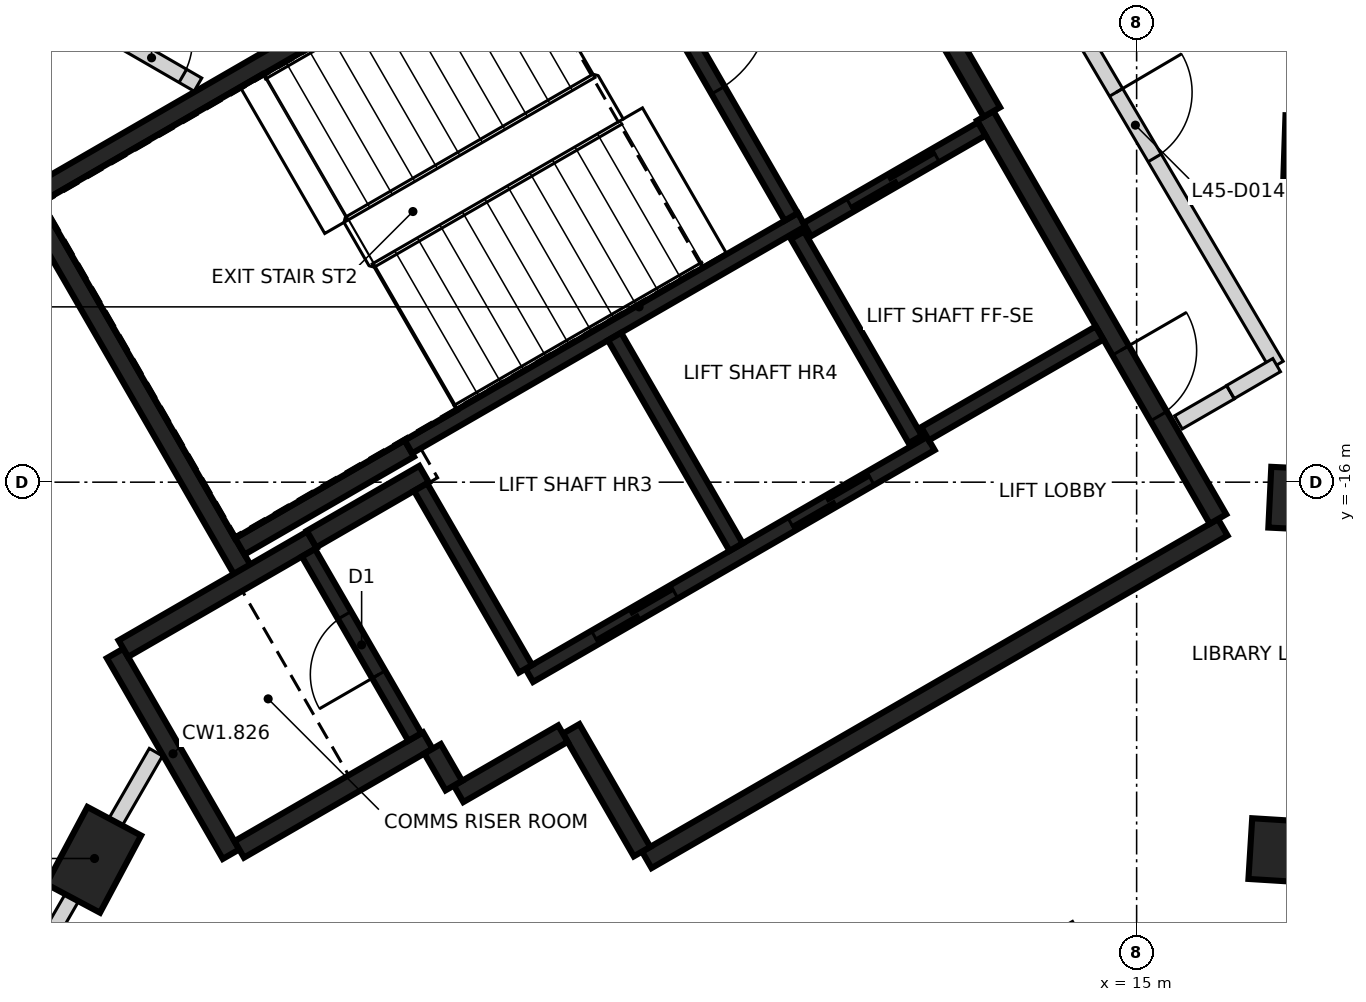
"""IFC4 building model, lengths in metres.
Left out: names, types, materials, properties, quantities, classifications, styles, units other than length and angle.
Written with IfcOpenShell. Run it as: python <this file> out.ifc"""

import sys

from ifc_helpers import new_model, si_unit, direction, frame, frame_2d, origin, origin_2d, place, context, subcontext, project, spatial, rectangle, extrude, element, fill, save


model = new_model("IFC4")
c1 = context("Model", 3, precision=1e-05, world=origin(), true_north=direction((0.0, 1.0)))
c2 = subcontext(c1, "Body", "Model", "MODEL_VIEW")
j1 = project(units=[si_unit("LENGTHUNIT", "METRE"), si_unit("PLANEANGLEUNIT", "RADIAN")], contexts=[c1])
p1 = place(None, origin())
s1 = spatial("IfcSite", under=j1, at=p1, CompositionType="ELEMENT")
p2 = place(p1, origin())
s2 = spatial("IfcBuilding", under=s1, at=p2, CompositionType="ELEMENT")
p3 = place(p2, frame((0.0, 0.0, 182.8)))
s3 = spatial("IfcBuildingStorey", under=s2, at=p3, CompositionType="ELEMENT", Elevation=182.8)
for number, where, z_axis, x_axis in (
    (1, (17.07, -20.856, -0.35), (0.0, 0.0, 1.0), (-0.998, 0.062, 0.0)),
    (2, (17.326, -16.226, -0.35), (0.0, 0.0, 1.0), (-0.999, 0.048, 0.0)),
    (3, (17.519, -11.592, -0.35), (0.0, 0.0, 1.0), (-0.999, 0.034, 0.0)),
    (4, (1.279, -20.968, -0.35), (0.0, 0.0, 1.0), (0.47, 0.883, 0.0)),
):
    element("IfcColumn", number, at=place(p3, frame(where, z_axis=z_axis, x_axis=x_axis)), inside=s3, PredefinedType="COLUMN", context=c2, shape_type="SweptSolid", body=[
        extrude(rectangle(XDim=1.15, YDim=0.8, at=origin_2d()), origin(), (0.0, 0.0, 1.0), 3.6),
    ])
p4 = place(p3, frame((0.417, -12.273, 0.0), z_axis=(0.0, 0.0, 1.0), x_axis=(0.866021906294, 0.500006057782, 0.0)))
e5 = element("IfcWall", 5, at=p4, inside=s3, PredefinedType="SHEAR", context=c2, shape_type="SweptSolid", body=[
    extrude(rectangle(XDim=11.55, YDim=0.25, at=frame_2d((5.775, 0.0))), origin(), (0.0, 0.0, 1.0), 3.25),
])
p5 = place(p4, frame((10.025, 0.0, 0.0)))
e6 = element("IfcOpeningElement", 6, at=p5, cuts=e5, PredefinedType="OPENING", context=c2, shape_type="SweptSolid", body=[
    extrude(rectangle(XDim=1.2, YDim=2.1, at=frame_2d((0.6, 1.05))), frame((0.0, 0.135, 0.0), z_axis=(0.0, -1.0, 0.0), x_axis=(1.0, 0.0, 0.0)), (0.0, 0.0, 1.0), 0.27),
])
p6 = place(p4, frame((8.725, 0.0, 0.0)))
e7 = element("IfcOpeningElement", 7, at=p6, cuts=e5, PredefinedType="OPENING", context=c2, shape_type="SweptSolid", body=[
    extrude(rectangle(XDim=1.2, YDim=2.1, at=frame_2d((0.6, 1.05))), frame((0.0, 0.135, 0.0), z_axis=(0.0, -1.0, 0.0), x_axis=(1.0, 0.0, 0.0)), (0.0, 0.0, 1.0), 0.27),
])
p7 = place(p3, frame((16.133, -16.594, 0.0), z_axis=(0.0, 0.0, 1.0), x_axis=(-0.866022959057, -0.500004234368, 0.0)))
e8 = element("IfcWall", 8, at=p7, inside=s3, PredefinedType="SHEAR", context=c2, shape_type="SweptSolid", body=[
    extrude(rectangle(XDim=8.75, YDim=0.25, at=frame_2d((4.375, 0.0))), origin(), (0.0, 0.0, 1.0), 3.25),
])
p8 = place(p3, frame((13.008, -11.181, 0.0), z_axis=(0.0, 0.0, 1.0), x_axis=(0.500001955336, -0.866024274868, 0.0)))
e9 = element("IfcWall", 9, at=p8, inside=s3, PredefinedType="SHEAR", context=c2, shape_type="SweptSolid", body=[
    extrude(rectangle(XDim=6.125, YDim=0.25, at=frame_2d((3.062, 0.0))), origin(), (0.0, 0.0, 1.0), 3.25),
])
p9 = place(p8, frame((3.563, 0.0, 0.0)))
e10 = element("IfcOpeningElement", 10, at=p9, cuts=e9, PredefinedType="OPENING", context=c2, shape_type="SweptSolid", body=[
    extrude(rectangle(XDim=1.0, YDim=2.1, at=frame_2d((0.5, 1.05))), frame((0.0, 0.135, 0.0), z_axis=(0.0, -1.0, 0.0), x_axis=(1.0, 0.0, 0.0)), (0.0, 0.0, 1.0), 0.27),
])
p10 = place(p3, frame((3.235, -17.153, 0.0), z_axis=(0.0, 0.0, 1.0), x_axis=(-0.500008851346, 0.866020293397, 0.0)))
e11 = element("IfcWall", 11, at=p10, inside=s3, PredefinedType="SHEAR", context=c2, shape_type="SweptSolid", body=[
    extrude(rectangle(XDim=5.51, YDim=0.25, at=frame_2d((2.755, 0.0))), origin(), (0.0, 0.0, 1.0), 3.25),
])
p11 = place(p3, frame((10.483, -6.606, 0.0), z_axis=(0.0, 0.0, 1.0), x_axis=(0.49999885962, -0.866026062182, 0.0)))
e12 = element("IfcWall", 12, at=p11, inside=s3, PredefinedType="SHEAR", context=c2, shape_type="SweptSolid", body=[
    extrude(rectangle(XDim=5.225, YDim=0.25, at=frame_2d((2.612, 0.0))), origin(), (0.0, 0.0, 1.0), 3.25),
])
p12 = place(p3, frame((3.085, -20.894, 0.0), z_axis=(0.0, 0.0, 1.0), x_axis=(-0.499978833458, 0.866037623948, 0.0)))
e13 = element("IfcWall", 13, at=p12, inside=s3, PredefinedType="SHEAR", context=c2, shape_type="SweptSolid", body=[
    extrude(rectangle(XDim=3.05, YDim=0.25, at=frame_2d((1.525, 0.0))), origin(), (0.0, 0.0, 1.0), 3.25),
])
p13 = place(p3, frame((1.669, -18.19, 0.0), z_axis=(0.0, 0.0, 1.0), x_axis=(0.866042235819, 0.499970844928, 0.0)))
e14 = element("IfcWall", 14, at=p13, inside=s3, PredefinedType="SHEAR", context=c2, shape_type="SweptSolid", body=[
    extrude(rectangle(XDim=2.865, YDim=0.25, at=frame_2d((1.432, 0.0))), origin(), (0.0, 0.0, 1.0), 3.25),
])
p14 = place(p3, frame((5.675, -19.399, 0.0), z_axis=(0.0, 0.0, 1.0), x_axis=(-0.866026637627, -0.499997862916, 0.0)))
e15 = element("IfcWall", 15, at=p14, inside=s3, PredefinedType="SHEAR", context=c2, shape_type="SweptSolid", body=[
    extrude(rectangle(XDim=2.865, YDim=0.25, at=frame_2d((1.432, 0.0))), origin(), (0.0, 0.0, 1.0), 3.25),
])
p15 = place(p3, frame((5.431, -15.556, 0.0), z_axis=(0.0, 0.0, 1.0), x_axis=(-0.866022940537, -0.500004266446, 0.0)))
e16 = element("IfcWall", 16, at=p15, inside=s3, PredefinedType="SHEAR", context=c2, shape_type="SweptSolid", body=[
    extrude(rectangle(XDim=2.575, YDim=0.25, at=frame_2d((1.287, 0.0))), origin(), (0.0, 0.0, 1.0), 3.25),
])
p16 = place(p3, frame((8.493, -20.86, 0.0), z_axis=(0.0, 0.0, 1.0), x_axis=(-0.500039802285, 0.866002422705, 0.0)))
e17 = element("IfcWall", 17, at=p16, inside=s3, PredefinedType="SHEAR", context=c2, shape_type="SweptSolid", body=[
    extrude(rectangle(XDim=1.865, YDim=0.25, at=frame_2d((0.932, 0.0))), origin(), (0.0, 0.0, 1.0), 3.25),
])
p17 = place(p3, frame((4.145, -16.749, 0.0), z_axis=(0.0, 0.0, 1.0), x_axis=(0.866038183914, 0.499977863513, 0.0)))
e18 = element("IfcWall", 18, at=p17, inside=s3, PredefinedType="SHEAR", context=c2, shape_type="SweptSolid", body=[
    extrude(rectangle(XDim=1.71, YDim=0.25, at=frame_2d((0.855, 0.0))), origin(), (0.0, 0.0, 1.0), 3.25),
])
p18 = place(p3, frame((7.452, -19.308, 0.0), z_axis=(0.0, 0.0, 1.0), x_axis=(-0.866044474677, -0.49996696679, 0.0)))
e19 = element("IfcWall", 19, at=p18, inside=s3, PredefinedType="SHEAR", context=c2, shape_type="SweptSolid", body=[
    extrude(rectangle(XDim=1.584, YDim=0.25, at=frame_2d((0.792, 0.0))), origin(), (0.0, 0.0, 1.0), 3.25),
])
p19 = place(p3, frame((6.017, -19.992, 0.0), z_axis=(0.0, 0.0, 1.0), x_axis=(-0.500364886717, 0.865814633822, 0.0)))
e20 = element("IfcWall", 20, at=p19, inside=s3, PredefinedType="SHEAR", context=c2, shape_type="SweptSolid", body=[
    extrude(rectangle(XDim=0.559, YDim=0.25, at=frame_2d((0.28, 0.0))), origin(), (0.0, 0.0, 1.0), 3.25),
])
p20 = place(p3, frame((5.419, -15.534, 0.0), z_axis=(0.0, 0.0, 1.0), x_axis=(0.866029065029, 0.499993658486, 0.0)))
e21 = element("IfcWall", 21, at=p20, inside=s3, PredefinedType="SHEAR", context=c2, shape_type="SweptSolid", body=[
    extrude(rectangle(XDim=5.974, YDim=0.2, at=frame_2d((2.987, 0.0))), origin(), (0.0, 0.0, 1.0), 3.25),
])
p21 = place(p3, frame((7.01, -18.542, 0.0), z_axis=(0.0, 0.0, 1.0), x_axis=(0.866030299012, 0.499991521122, 0.0)))
e22 = element("IfcWall", 22, at=p21, inside=s3, PredefinedType="SHEAR", context=c2, shape_type="SweptSolid", body=[
    extrude(rectangle(XDim=6.1, YDim=0.2, at=frame_2d((3.05, 0.0))), origin(), (0.0, 0.0, 1.0), 3.25),
])
p22 = place(p21, frame((1.0, 0.0, 0.0)))
e23 = element("IfcOpeningElement", 23, at=p22, cuts=e22, PredefinedType="OPENING", context=c2, shape_type="SweptSolid", body=[
    extrude(rectangle(XDim=1.2, YDim=2.1, at=frame_2d((0.6, 1.05))), frame((0.0, 0.11, 0.0), z_axis=(0.0, -1.0, 0.0), x_axis=(1.0, 0.0, 0.0)), (0.0, 0.0, 1.0), 0.22),
])
p23 = place(p21, frame((3.982, 0.0, 0.0)))
e24 = element("IfcOpeningElement", 24, at=p23, cuts=e22, PredefinedType="OPENING", context=c2, shape_type="SweptSolid", body=[
    extrude(rectangle(XDim=1.2, YDim=2.1, at=frame_2d((0.6, 1.05))), frame((0.0, 0.11, 0.0), z_axis=(0.0, -1.0, 0.0), x_axis=(1.0, 0.0, 0.0)), (0.0, 0.0, 1.0), 0.22),
])
p24 = place(p3, frame((7.906, -8.094, 0.0), z_axis=(0.0, 0.0, 1.0), x_axis=(0.500027839223, -0.866009330205, 0.0)))
e25 = element("IfcWall", 25, at=p24, inside=s3, PredefinedType="SHEAR", context=c2, shape_type="SweptSolid", body=[
    extrude(rectangle(XDim=5.098, YDim=0.2, at=frame_2d((2.549, 0.0))), origin(), (0.0, 0.0, 1.0), 3.25),
])
p25 = place(p24, frame((1.774, 0.0, 0.0)))
e26 = element("IfcOpeningElement", 26, at=p25, cuts=e25, PredefinedType="OPENING", context=c2, shape_type="SweptSolid", body=[
    extrude(rectangle(XDim=1.4, YDim=2.1, at=frame_2d((0.7, 1.05))), frame((0.0, 0.11, 0.0), z_axis=(0.0, -1.0, 0.0), x_axis=(1.0, 0.0, 0.0)), (0.0, 0.0, 1.0), 0.22),
])
p26 = place(p3, frame((8.132, -14.084, 0.0), z_axis=(0.0, 0.0, 1.0), x_axis=(0.499997778408, -0.866026686418, 0.0)))
e27 = element("IfcWall", 27, at=p26, inside=s3, PredefinedType="SHEAR", context=c2, shape_type="SweptSolid", body=[
    extrude(rectangle(XDim=3.198, YDim=0.2, at=frame_2d((1.599, 0.0))), origin(), (0.0, 0.0, 1.0), 3.25),
])
p27 = place(p3, frame((5.503, -19.352, 0.0), z_axis=(0.0, 0.0, 1.0), x_axis=(-0.499986818241, 0.866033014143, 0.0)))
e28 = element("IfcWall", 28, at=p27, inside=s3, PredefinedType="SHEAR", context=c2, shape_type="SweptSolid", body=[
    extrude(rectangle(XDim=2.798, YDim=0.2, at=frame_2d((1.399, 0.0))), origin(), (0.0, 0.0, 1.0), 3.25),
])
p28 = place(p27, frame((0.949, 0.0, 0.0)))
e29 = element("IfcOpeningElement", 29, at=p28, cuts=e28, PredefinedType="OPENING", context=c2, shape_type="SweptSolid", body=[
    extrude(rectangle(XDim=0.9, YDim=2.1, at=frame_2d((0.45, 1.05))), frame((0.0, 0.11, 0.0), z_axis=(0.0, -1.0, 0.0), x_axis=(1.0, 0.0, 0.0)), (0.0, 0.0, 1.0), 0.22),
])
p29 = place(p3, frame((6.96, -18.455, 0.0), z_axis=(0.0, 0.0, 1.0), x_axis=(-0.499926705758, 0.866067716099, 0.0)))
e30 = element("IfcWall", 30, at=p29, inside=s3, PredefinedType="SHEAR", context=c2, shape_type="SweptSolid", body=[
    extrude(rectangle(XDim=2.759, YDim=0.2, at=frame_2d((1.38, 0.0))), origin(), (0.0, 0.0, 1.0), 3.25),
])
p30 = place(p3, frame((12.088, -15.437, 0.0), z_axis=(0.0, 0.0, 1.0), x_axis=(-0.500026960575, 0.86600983753, 0.0)))
e31 = element("IfcWall", 31, at=p30, inside=s3, PredefinedType="SHEAR", context=c2, shape_type="SweptSolid", body=[
    extrude(rectangle(XDim=3.1, YDim=0.2, at=frame_2d((1.55, 0.0))), origin(), (0.0, 0.0, 1.0), 3.25),
])
p31 = place(p3, frame((10.666, -12.678, 0.0), z_axis=(0.0, 0.0, 1.0), x_axis=(0.866018407898, 0.500012117035, 0.0)))
e32 = element("IfcWall", 32, at=p31, inside=s3, PredefinedType="SHEAR", context=c2, shape_type="SweptSolid", body=[
    extrude(rectangle(XDim=2.651, YDim=0.2, at=frame_2d((1.325, 0.0))), origin(), (0.0, 0.0, 1.0), 3.25),
])
p32 = place(p31, frame((0.652, 0.0, 0.0)))
e33 = element("IfcOpeningElement", 33, at=p32, cuts=e32, PredefinedType="OPENING", context=c2, shape_type="SweptSolid", body=[
    extrude(rectangle(XDim=1.3, YDim=2.1, at=frame_2d((0.65, 1.05))), frame((0.0, 0.11, 0.0), z_axis=(0.0, -1.0, 0.0), x_axis=(1.0, 0.0, 0.0)), (0.0, 0.0, 1.0), 0.22),
])
p33 = place(p3, frame((14.512, -14.037, 0.0), z_axis=(0.0, 0.0, 1.0), x_axis=(-0.866018407898, -0.500012117035, 0.0)))
e34 = element("IfcWall", 34, at=p33, inside=s3, PredefinedType="SHEAR", context=c2, shape_type="SweptSolid", body=[
    extrude(rectangle(XDim=2.651, YDim=0.2, at=frame_2d((1.325, 0.0))), origin(), (0.0, 0.0, 1.0), 3.25),
])
p34 = place(p3, frame((-8.301, -4.445, 0.0), z_axis=(0.0, 0.0, 1.0), x_axis=(0.865969859016, -0.500096194023, 0.0)))
e35 = element("IfcWall", 35, at=p34, inside=s3, PredefinedType="PARTITIONING", context=c2, shape_type="SweptSolid", body=[
    extrude(rectangle(XDim=12.647, YDim=0.2, at=frame_2d((6.323, 0.0))), origin(), (0.0, 0.0, 1.0), 3.25),
])
p35 = place(p34, frame((2.836, 0.0, 0.0)))
e36 = element("IfcOpeningElement", 36, at=p35, cuts=e35, PredefinedType="OPENING", context=c2, shape_type="SweptSolid", body=[
    extrude(rectangle(XDim=0.95, YDim=2.1, at=frame_2d((0.475, 1.05))), frame((0.0, 0.11, 0.0), z_axis=(0.0, -1.0, 0.0), x_axis=(1.0, 0.0, 0.0)), (0.0, 0.0, 1.0), 0.22),
])
p36 = place(p34, frame((11.467, 0.0, 0.0)))
e37 = element("IfcOpeningElement", 37, at=p36, cuts=e35, PredefinedType="OPENING", context=c2, shape_type="SweptSolid", body=[
    extrude(rectangle(XDim=0.95, YDim=2.1, at=frame_2d((0.475, 1.05))), frame((0.0, 0.11, 0.0), z_axis=(0.0, -1.0, 0.0), x_axis=(1.0, 0.0, 0.0)), (0.0, 0.0, 1.0), 0.22),
])
p37 = place(p3, frame((11.571, -5.505, 0.0), z_axis=(0.0, 0.0, 1.0), x_axis=(0.507311705706, -0.861762631618, 0.0)))
e38 = element("IfcWall", 38, at=p37, inside=s3, PredefinedType="PARTITIONING", context=c2, shape_type="SweptSolid", body=[
    extrude(rectangle(XDim=10.391, YDim=0.2, at=frame_2d((5.196, 0.0))), origin(), (0.0, 0.0, 1.0), 3.25),
])
p38 = place(p37, frame((6.228, 0.0, 0.0)))
e39 = element("IfcOpeningElement", 39, at=p38, cuts=e38, PredefinedType="OPENING", context=c2, shape_type="SweptSolid", body=[
    extrude(rectangle(XDim=1.0, YDim=2.1, at=frame_2d((0.5, 1.05))), frame((0.0, 0.11, 0.0), z_axis=(0.0, -1.0, 0.0), x_axis=(1.0, 0.0, 0.0)), (0.0, 0.0, 1.0), 0.22),
])
p39 = place(p3, frame((15.55, -15.213, 0.0), z_axis=(0.0, 0.0, 1.0), x_axis=(0.865989998118, 0.500061319399, 0.0)))
e40 = element("IfcWall", 40, at=p39, inside=s3, PredefinedType="PARTITIONING", context=c2, shape_type="SweptSolid", body=[
    extrude(rectangle(XDim=0.79, YDim=0.2, at=frame_2d((0.395, 0.0))), origin(), (0.0, 0.0, 1.0), 3.25),
])
p40 = place(p3, frame((16.235, -14.814, 0.0), z_axis=(0.0, 0.0, 1.0), x_axis=(0.863804104711, 0.503827816505, 0.0)))
e41 = element("IfcWall", 41, at=p40, inside=s3, PredefinedType="PARTITIONING", context=c2, shape_type="SweptSolid", body=[
    extrude(rectangle(XDim=0.703, YDim=0.2, at=frame_2d((0.351, 0.0))), origin(), (0.0, 0.0, 1.0), 3.25),
])
p41 = place(p3, frame((0.482, -22.349, 0.0), z_axis=(0.0, 0.0, 1.0), x_axis=(0.500016891966, 0.866015650984, 0.0)))
e42 = element("IfcWall", 42, at=p41, inside=s3, PredefinedType="PARTITIONING", context=c2, shape_type="SweptSolid", body=[
    extrude(rectangle(XDim=3.23, YDim=0.2, at=frame_2d((1.615, 0.0))), origin(), (0.0, 0.0, 1.0), 3.25),
])
p42 = place(p32, origin())
e43 = element("IfcDoor", 43, at=p42, inside=s3, OperationType="SLIDING_TO_LEFT", PredefinedType="DOOR", context=c2, shape_type="SweptSolid", body=[
    extrude(rectangle(XDim=1.3, YDim=2.1, at=frame_2d((0.65, 1.05))), frame((0.0, 0.025, 0.0), z_axis=(0.0, -1.0, 0.0), x_axis=(1.0, 0.0, 0.0)), (0.0, 0.0, 1.0), 0.05),
])
fill(e33, e43)
p43 = place(p22, origin())
e44 = element("IfcDoor", 44, at=p43, inside=s3, OperationType="DOUBLE_DOOR_SLIDING", PredefinedType="DOOR", context=c2, shape_type="SweptSolid", body=[
    extrude(rectangle(XDim=1.2, YDim=2.1, at=frame_2d((0.6, 1.05))), frame((0.0, 0.025, 0.0), z_axis=(0.0, -1.0, 0.0), x_axis=(1.0, 0.0, 0.0)), (0.0, 0.0, 1.0), 0.05),
])
fill(e23, e44)
p44 = place(p23, origin())
e45 = element("IfcDoor", 45, at=p44, inside=s3, OperationType="DOUBLE_DOOR_SLIDING", PredefinedType="DOOR", context=c2, shape_type="SweptSolid", body=[
    extrude(rectangle(XDim=1.2, YDim=2.1, at=frame_2d((0.6, 1.05))), frame((0.0, 0.025, 0.0), z_axis=(0.0, -1.0, 0.0), x_axis=(1.0, 0.0, 0.0)), (0.0, 0.0, 1.0), 0.05),
])
fill(e24, e45)
p45 = place(p9, origin())
e46 = element("IfcDoor", 46, at=p45, inside=s3, OperationType="SINGLE_SWING_LEFT", PredefinedType="DOOR", context=c2, shape_type="SweptSolid", body=[
    extrude(rectangle(XDim=1.0, YDim=2.1, at=frame_2d((0.5, 1.05))), frame((0.0, 0.025, 0.0), z_axis=(0.0, -1.0, 0.0), x_axis=(1.0, 0.0, 0.0)), (0.0, 0.0, 1.0), 0.05),
])
fill(e10, e46)
p46 = place(p25, origin())
e47 = element("IfcDoor", 47, at=p46, inside=s3, OperationType="SINGLE_SWING_LEFT", PredefinedType="DOOR", context=c2, shape_type="SweptSolid", body=[
    extrude(rectangle(XDim=1.4, YDim=2.1, at=frame_2d((0.7, 1.05))), frame((0.0, 0.025, 0.0), z_axis=(0.0, -1.0, 0.0), x_axis=(1.0, 0.0, 0.0)), (0.0, 0.0, 1.0), 0.05),
])
fill(e26, e47)
p47 = place(p28, origin())
e48 = element("IfcDoor", 48, at=p47, inside=s3, OperationType="SINGLE_SWING_RIGHT", PredefinedType="DOOR", context=c2, shape_type="SweptSolid", body=[
    extrude(rectangle(XDim=0.9, YDim=2.1, at=frame_2d((0.45, 1.05))), frame((0.0, 0.025, 0.0), z_axis=(0.0, -1.0, 0.0), x_axis=(1.0, 0.0, 0.0)), (0.0, 0.0, 1.0), 0.05),
])
fill(e29, e48)
p48 = place(p36, frame((0.95, 0.0, 0.0), z_axis=(0.0, 0.0, 1.0), x_axis=(-1.0, 0.0, 0.0)))
e49 = element("IfcDoor", 49, at=p48, inside=s3, OperationType="SINGLE_SWING_LEFT", PredefinedType="DOOR", context=c2, shape_type="SweptSolid", body=[
    extrude(rectangle(XDim=0.95, YDim=2.1, at=frame_2d((0.475, 1.05))), frame((0.0, 0.025, 0.0), z_axis=(0.0, -1.0, 0.0), x_axis=(1.0, 0.0, 0.0)), (0.0, 0.0, 1.0), 0.05),
])
fill(e37, e49)
p49 = place(p38, frame((1.0, 0.0, 0.0), z_axis=(0.0, 0.0, 1.0), x_axis=(-1.0, 0.0, 0.0)))
e50 = element("IfcDoor", 50, at=p49, inside=s3, OperationType="SINGLE_SWING_LEFT", PredefinedType="DOOR", context=c2, shape_type="SweptSolid", body=[
    extrude(rectangle(XDim=1.0, YDim=2.1, at=frame_2d((0.5, 1.05))), frame((0.0, 0.025, 0.0), z_axis=(0.0, -1.0, 0.0), x_axis=(1.0, 0.0, 0.0)), (0.0, 0.0, 1.0), 0.05),
])
fill(e39, e50)
save(model, sys.argv[1])
